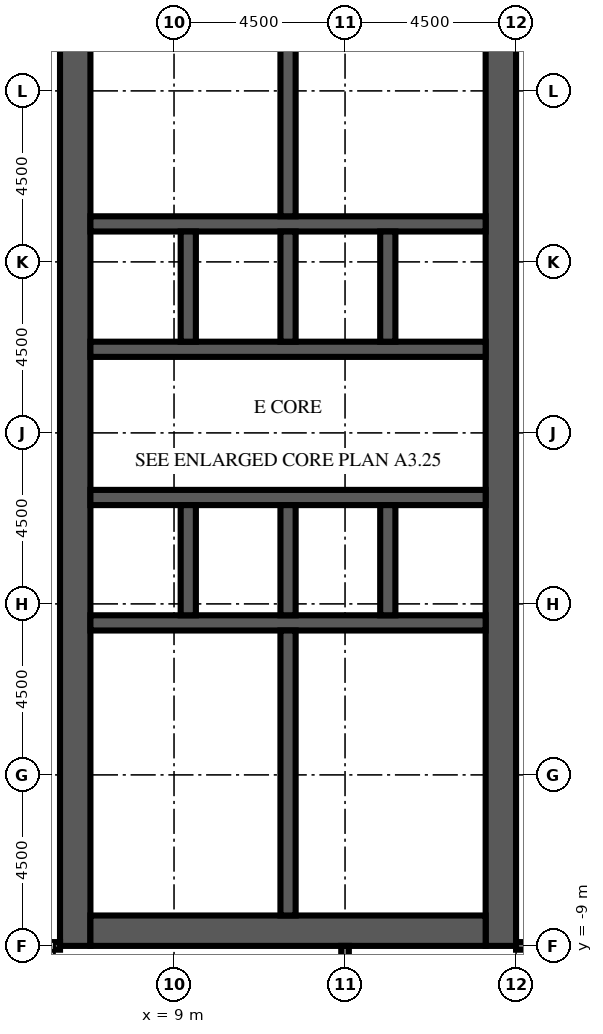
"""IFC4 building model, lengths in metres.
Left out: names, types, materials, properties, quantities, classifications, styles, units other than length and angle.
Written with IfcOpenShell. Run it as: python <this file> out.ifc"""

import sys

from ifc_helpers import new_model, si_unit, direction, frame, frame_2d, origin, place, context, subcontext, project, spatial, rectangle, extrude, element, fill, save


model = new_model("IFC4")
c1 = context("Model", 3, precision=1e-05, world=origin(), true_north=direction((0.0, 1.0)))
c2 = subcontext(c1, "Body", "Model", "MODEL_VIEW")
j1 = project(units=[si_unit("LENGTHUNIT", "METRE"), si_unit("PLANEANGLEUNIT", "RADIAN")], contexts=[c1])
p1 = place(None, origin())
s1 = spatial("IfcSite", under=j1, at=p1, CompositionType="ELEMENT")
p2 = place(p1, origin())
s2 = spatial("IfcBuilding", under=s1, at=p2, CompositionType="ELEMENT")
p3 = place(p2, frame((0.0, 0.0, 160.9)))
s3 = spatial("IfcBuildingStorey", under=s2, at=p3, CompositionType="ELEMENT", Elevation=160.9)
p4 = place(p3, frame((6.4, -9.0, 0.0), z_axis=(0.0, 0.0, 1.0), x_axis=(0.0, 1.0, 0.0)))
e1 = element("IfcWall", 1, at=p4, inside=s3, PredefinedType="SHEAR", context=c2, shape_type="SweptSolid", body=[
    extrude(rectangle(XDim=27.5, YDim=0.8, at=frame_2d((13.75, 0.0))), origin(), (0.0, 0.0, 1.0), 4.1),
])
p5 = place(p4, frame((12.55, 0.0, 0.0)))
e2 = element("IfcOpeningElement", 2, at=p5, cuts=e1, PredefinedType="OPENING", context=c2, shape_type="SweptSolid", body=[
    extrude(rectangle(XDim=2.4, YDim=2.4, at=frame_2d((1.2, 1.2))), frame((0.0, 0.41, 0.0), z_axis=(0.0, -1.0, 0.0), x_axis=(1.0, 0.0, 0.0)), (0.0, 0.0, 1.0), 0.82),
])
p6 = place(p4, frame((5.45, 0.0, 0.0)))
e3 = element("IfcOpeningElement", 3, at=p6, cuts=e1, PredefinedType="OPENING", context=c2, shape_type="SweptSolid", body=[
    extrude(rectangle(XDim=1.2, YDim=2.1, at=frame_2d((0.6, 1.05))), frame((0.0, 0.41, 0.0), z_axis=(0.0, -1.0, 0.0), x_axis=(1.0, 0.0, 0.0)), (0.0, 0.0, 1.0), 0.82),
])
p7 = place(p4, frame((19.45, 0.0, 0.0)))
e4 = element("IfcOpeningElement", 4, at=p7, cuts=e1, PredefinedType="OPENING", context=c2, shape_type="SweptSolid", body=[
    extrude(rectangle(XDim=1.0, YDim=2.1, at=frame_2d((0.5, 1.05))), frame((0.0, 0.41, 0.0), z_axis=(0.0, -1.0, 0.0), x_axis=(1.0, 0.0, 0.0)), (0.0, 0.0, 1.0), 0.82),
])
p8 = place(p4, frame((21.137, 0.0, 0.0)))
e5 = element("IfcOpeningElement", 5, at=p8, cuts=e1, PredefinedType="OPENING", context=c2, shape_type="SweptSolid", body=[
    extrude(rectangle(XDim=1.0, YDim=2.1, at=frame_2d((0.5, 1.05))), frame((0.0, 0.41, 0.0), z_axis=(0.0, -1.0, 0.0), x_axis=(1.0, 0.0, 0.0)), (0.0, 0.0, 1.0), 0.82),
])
p9 = place(p4, frame((23.2, 0.0, 0.0)))
e6 = element("IfcOpeningElement", 6, at=p9, cuts=e1, PredefinedType="OPENING", context=c2, shape_type="SweptSolid", body=[
    extrude(rectangle(XDim=1.0, YDim=2.1, at=frame_2d((0.5, 1.05))), frame((0.0, 0.41, 0.0), z_axis=(0.0, -1.0, 0.0), x_axis=(1.0, 0.0, 0.0)), (0.0, 0.0, 1.0), 0.82),
])
p10 = place(p4, frame((25.262, 0.0, 0.0)))
e7 = element("IfcOpeningElement", 7, at=p10, cuts=e1, PredefinedType="OPENING", context=c2, shape_type="SweptSolid", body=[
    extrude(rectangle(XDim=1.0, YDim=2.1, at=frame_2d((0.5, 1.05))), frame((0.0, 0.41, 0.0), z_axis=(0.0, -1.0, 0.0), x_axis=(1.0, 0.0, 0.0)), (0.0, 0.0, 1.0), 0.82),
])
p11 = place(p3, frame((17.6, -9.0, 0.0), z_axis=(0.0, 0.0, 1.0), x_axis=(0.0, 1.0, 0.0)))
e8 = element("IfcWall", 8, at=p11, inside=s3, PredefinedType="SHEAR", context=c2, shape_type="SweptSolid", body=[
    extrude(rectangle(XDim=27.5, YDim=0.8, at=frame_2d((13.75, 0.0))), origin(), (0.0, 0.0, 1.0), 4.1),
])
p12 = place(p11, frame((12.55, 0.0, 0.0)))
e9 = element("IfcOpeningElement", 9, at=p12, cuts=e8, PredefinedType="OPENING", context=c2, shape_type="SweptSolid", body=[
    extrude(rectangle(XDim=2.4, YDim=2.4, at=frame_2d((1.2, 1.2))), frame((0.0, 0.41, 0.0), z_axis=(0.0, -1.0, 0.0), x_axis=(1.0, 0.0, 0.0)), (0.0, 0.0, 1.0), 0.82),
])
p13 = place(p11, frame((6.825, 0.0, 0.0)))
e10 = element("IfcOpeningElement", 10, at=p13, cuts=e8, PredefinedType="OPENING", context=c2, shape_type="SweptSolid", body=[
    extrude(rectangle(XDim=1.2, YDim=2.1, at=frame_2d((0.6, 1.05))), frame((0.0, 0.41, 0.0), z_axis=(0.0, -1.0, 0.0), x_axis=(1.0, 0.0, 0.0)), (0.0, 0.0, 1.0), 0.82),
])
p14 = place(p11, frame((19.475, 0.0, 0.0)))
e11 = element("IfcOpeningElement", 11, at=p14, cuts=e8, PredefinedType="OPENING", context=c2, shape_type="SweptSolid", body=[
    extrude(rectangle(XDim=1.2, YDim=2.1, at=frame_2d((0.6, 1.05))), frame((0.0, 0.41, 0.0), z_axis=(0.0, -1.0, 0.0), x_axis=(1.0, 0.0, 0.0)), (0.0, 0.0, 1.0), 0.82),
])
p15 = place(p3, frame((6.8, -8.6, 0.0), z_axis=(0.0, 0.0, 1.0), x_axis=(1.0, 0.0, 0.0)))
e12 = element("IfcWall", 12, at=p15, inside=s3, PredefinedType="SHEAR", context=c2, shape_type="SweptSolid", body=[
    extrude(rectangle(XDim=10.4, YDim=0.8, at=frame_2d((5.2, 0.0))), origin(), (0.0, 0.0, 1.0), 4.1),
])
p16 = place(p3, frame((6.8, -0.5, 0.0), z_axis=(0.0, 0.0, 1.0), x_axis=(1.0, 0.0, 0.0)))
e13 = element("IfcWall", 13, at=p16, inside=s3, PredefinedType="SHEAR", context=c2, shape_type="SweptSolid", body=[
    extrude(rectangle(XDim=10.4, YDim=0.4, at=frame_2d((5.2, 0.0))), origin(), (0.0, 0.0, 1.0), 4.1),
])
p17 = place(p3, frame((6.8, 2.8, 0.0), z_axis=(0.0, 0.0, 1.0), x_axis=(1.0, 0.0, 0.0)))
e14 = element("IfcWall", 14, at=p17, inside=s3, PredefinedType="SHEAR", context=c2, shape_type="SweptSolid", body=[
    extrude(rectangle(XDim=10.4, YDim=0.4, at=frame_2d((5.2, 0.0))), origin(), (0.0, 0.0, 1.0), 4.1),
])
p18 = place(p17, frame((0.738, 0.0, 0.0)))
e15 = element("IfcOpeningElement", 15, at=p18, cuts=e14, PredefinedType="OPENING", context=c2, shape_type="SweptSolid", body=[
    extrude(rectangle(XDim=1.1, YDim=2.1, at=frame_2d((0.55, 1.05))), frame((0.0, 0.21, 0.0), z_axis=(0.0, -1.0, 0.0), x_axis=(1.0, 0.0, 0.0)), (0.0, 0.0, 1.0), 0.42),
])
p19 = place(p17, frame((3.337, 0.0, 0.0)))
e16 = element("IfcOpeningElement", 16, at=p19, cuts=e14, PredefinedType="OPENING", context=c2, shape_type="SweptSolid", body=[
    extrude(rectangle(XDim=1.1, YDim=2.1, at=frame_2d((0.55, 1.05))), frame((0.0, 0.21, 0.0), z_axis=(0.0, -1.0, 0.0), x_axis=(1.0, 0.0, 0.0)), (0.0, 0.0, 1.0), 0.42),
])
p20 = place(p17, frame((6.012, 0.0, 0.0)))
e17 = element("IfcOpeningElement", 17, at=p20, cuts=e14, PredefinedType="OPENING", context=c2, shape_type="SweptSolid", body=[
    extrude(rectangle(XDim=1.0, YDim=2.1, at=frame_2d((0.5, 1.05))), frame((0.0, 0.21, 0.0), z_axis=(0.0, -1.0, 0.0), x_axis=(1.0, 0.0, 0.0)), (0.0, 0.0, 1.0), 0.42),
])
p21 = place(p17, frame((8.613, 0.0, 0.0)))
e18 = element("IfcOpeningElement", 18, at=p21, cuts=e14, PredefinedType="OPENING", context=c2, shape_type="SweptSolid", body=[
    extrude(rectangle(XDim=1.0, YDim=2.1, at=frame_2d((0.5, 1.05))), frame((0.0, 0.21, 0.0), z_axis=(0.0, -1.0, 0.0), x_axis=(1.0, 0.0, 0.0)), (0.0, 0.0, 1.0), 0.42),
])
p22 = place(p3, frame((6.8, 6.7, 0.0), z_axis=(0.0, 0.0, 1.0), x_axis=(1.0, 0.0, 0.0)))
e19 = element("IfcWall", 19, at=p22, inside=s3, PredefinedType="SHEAR", context=c2, shape_type="SweptSolid", body=[
    extrude(rectangle(XDim=10.4, YDim=0.4, at=frame_2d((5.2, 0.0))), origin(), (0.0, 0.0, 1.0), 4.1),
])
p23 = place(p22, frame((3.337, 0.0, 0.0)))
e20 = element("IfcOpeningElement", 20, at=p23, cuts=e19, PredefinedType="OPENING", context=c2, shape_type="SweptSolid", body=[
    extrude(rectangle(XDim=1.1, YDim=2.1, at=frame_2d((0.55, 1.05))), frame((0.0, 0.21, 0.0), z_axis=(0.0, -1.0, 0.0), x_axis=(1.0, 0.0, 0.0)), (0.0, 0.0, 1.0), 0.42),
])
p24 = place(p22, frame((5.962, 0.0, 0.0)))
e21 = element("IfcOpeningElement", 21, at=p24, cuts=e19, PredefinedType="OPENING", context=c2, shape_type="SweptSolid", body=[
    extrude(rectangle(XDim=1.1, YDim=2.1, at=frame_2d((0.55, 1.05))), frame((0.0, 0.21, 0.0), z_axis=(0.0, -1.0, 0.0), x_axis=(1.0, 0.0, 0.0)), (0.0, 0.0, 1.0), 0.42),
])
p25 = place(p22, frame((8.663, 0.0, 0.0)))
e22 = element("IfcOpeningElement", 22, at=p25, cuts=e19, PredefinedType="OPENING", context=c2, shape_type="SweptSolid", body=[
    extrude(rectangle(XDim=1.1, YDim=2.1, at=frame_2d((0.55, 1.05))), frame((0.0, 0.21, 0.0), z_axis=(0.0, -1.0, 0.0), x_axis=(1.0, 0.0, 0.0)), (0.0, 0.0, 1.0), 0.42),
])
p26 = place(p22, frame((0.688, 0.0, 0.0)))
e23 = element("IfcOpeningElement", 23, at=p26, cuts=e19, PredefinedType="OPENING", context=c2, shape_type="SweptSolid", body=[
    extrude(rectangle(XDim=1.0, YDim=2.1, at=frame_2d((0.5, 1.05))), frame((0.0, 0.21, 0.0), z_axis=(0.0, -1.0, 0.0), x_axis=(1.0, 0.0, 0.0)), (0.0, 0.0, 1.0), 0.42),
])
p27 = place(p3, frame((6.8, 10.0, 0.0), z_axis=(0.0, 0.0, 1.0), x_axis=(1.0, 0.0, 0.0)))
e24 = element("IfcWall", 24, at=p27, inside=s3, PredefinedType="SHEAR", context=c2, shape_type="SweptSolid", body=[
    extrude(rectangle(XDim=10.4, YDim=0.4, at=frame_2d((5.2, 0.0))), origin(), (0.0, 0.0, 1.0), 4.1),
])
for number, where, z_axis, x_axis in (
    (25, (9.375, -0.3, 0.0), (0.0, 0.0, 1.0), (0.0, 1.0, 0.0)),
    (26, (9.375, 6.9, 0.0), (0.0, 0.0, 1.0), (0.0, 1.0, 0.0)),
    (27, (12.0, -0.3, 0.0), (0.0, 0.0, 1.0), (0.0, 1.0, 0.0)),
    (28, (12.0, 6.9, 0.0), (0.0, 0.0, 1.0), (0.0, 1.0, 0.0)),
    (29, (14.625, -0.3, 0.0), (0.0, 0.0, 1.0), (0.0, 1.0, 0.0)),
    (30, (14.625, 6.9, 0.0), (0.0, 0.0, 1.0), (0.0, 1.0, 0.0)),
):
    element("IfcWall", number, at=place(p3, frame(where, z_axis=z_axis, x_axis=x_axis)), inside=s3, PredefinedType="SHEAR", context=c2, shape_type="SweptSolid", body=[
        extrude(rectangle(XDim=2.9, YDim=0.4, at=frame_2d((1.45, 0.0))), origin(), (0.0, 0.0, 1.0), 4.1),
    ])
for number, where, z_axis, x_axis in (
    (31, (12.0, -8.2, 0.0), (0.0, 0.0, 1.0), (0.0, 1.0, 0.0)),
    (32, (12.0, 10.2, 0.0), (0.0, 0.0, 1.0), (0.0, 1.0, 0.0)),
):
    element("IfcWall", number, at=place(p3, frame(where, z_axis=z_axis, x_axis=x_axis)), inside=s3, PredefinedType="SHEAR", context=c2, shape_type="SweptSolid", body=[
        extrude(rectangle(XDim=7.5, YDim=0.4, at=frame_2d((3.75, 0.0))), origin(), (0.0, 0.0, 1.0), 4.1),
    ])
p28 = place(p3, frame((6.8, -5.2, 0.0), z_axis=(0.0, 0.0, 1.0), x_axis=(1.0, 0.0, 0.0)))
e33 = element("IfcWall", 33, at=p28, inside=s3, PredefinedType="PARTITIONING", context=c2, shape_type="SweptSolid", body=[
    extrude(rectangle(XDim=1.5, YDim=0.1, at=frame_2d((0.75, 0.0))), origin(), (0.0, 0.0, 1.0), 3.65),
])
p29 = place(p28, frame((0.25, 0.0, 0.0)))
e34 = element("IfcOpeningElement", 34, at=p29, cuts=e33, PredefinedType="OPENING", context=c2, shape_type="SweptSolid", body=[
    extrude(rectangle(XDim=1.0, YDim=2.1, at=frame_2d((0.5, 1.05))), frame((0.0, 0.06, 0.0), z_axis=(0.0, -1.0, 0.0), x_axis=(1.0, 0.0, 0.0)), (0.0, 0.0, 1.0), 0.12),
])
p30 = place(p3, frame((8.3, -5.2, 0.0), z_axis=(0.0, 0.0, 1.0), x_axis=(0.0, 1.0, 0.0)))
e35 = element("IfcWall", 35, at=p30, inside=s3, PredefinedType="PARTITIONING", context=c2, shape_type="SweptSolid", body=[
    extrude(rectangle(XDim=2.25, YDim=0.1, at=frame_2d((1.125, 0.0))), origin(), (0.0, 0.0, 1.0), 3.65),
])
p31 = place(p30, frame((0.625, 0.0, 0.0)))
e36 = element("IfcOpeningElement", 36, at=p31, cuts=e35, PredefinedType="OPENING", context=c2, shape_type="SweptSolid", body=[
    extrude(rectangle(XDim=1.0, YDim=2.1, at=frame_2d((0.5, 1.05))), frame((0.0, 0.06, 0.0), z_axis=(0.0, -1.0, 0.0), x_axis=(1.0, 0.0, 0.0)), (0.0, 0.0, 1.0), 0.12),
])
p32 = place(p3, frame((8.3, -2.95, 0.0), z_axis=(0.0, 0.0, 1.0), x_axis=(0.0, 1.0, 0.0)))
e37 = element("IfcWall", 37, at=p32, inside=s3, PredefinedType="PARTITIONING", context=c2, shape_type="SweptSolid", body=[
    extrude(rectangle(XDim=2.25, YDim=0.1, at=frame_2d((1.125, 0.0))), origin(), (0.0, 0.0, 1.0), 3.65),
])
p33 = place(p32, frame((0.625, 0.0, 0.0)))
e38 = element("IfcOpeningElement", 38, at=p33, cuts=e37, PredefinedType="OPENING", context=c2, shape_type="SweptSolid", body=[
    extrude(rectangle(XDim=1.0, YDim=2.1, at=frame_2d((0.5, 1.05))), frame((0.0, 0.06, 0.0), z_axis=(0.0, -1.0, 0.0), x_axis=(1.0, 0.0, 0.0)), (0.0, 0.0, 1.0), 0.12),
])
for number, where, z_axis, x_axis in (
    (39, (8.3, -5.2, 0.0), (0.0, 0.0, 1.0), (1.0, 0.0, 0.0)),
    (40, (8.3, -2.95, 0.0), (0.0, 0.0, 1.0), (1.0, 0.0, 0.0)),
):
    element("IfcWall", number, at=place(p3, frame(where, z_axis=z_axis, x_axis=x_axis)), inside=s3, PredefinedType="PARTITIONING", context=c2, shape_type="SweptSolid", body=[
        extrude(rectangle(XDim=3.5, YDim=0.1, at=frame_2d((1.75, 0.0))), origin(), (0.0, 0.0, 1.0), 3.65),
    ])
for number, where, z_axis, x_axis in (
    (41, (6.8, 11.7, 0.0), (0.0, 0.0, 1.0), (1.0, 0.0, 0.0)),
    (42, (6.8, 13.575, 0.0), (0.0, 0.0, 1.0), (1.0, 0.0, 0.0)),
):
    element("IfcWall", number, at=place(p3, frame(where, z_axis=z_axis, x_axis=x_axis)), inside=s3, PredefinedType="PARTITIONING", context=c2, shape_type="SweptSolid", body=[
        extrude(rectangle(XDim=5.0, YDim=0.1, at=frame_2d((2.5, 0.0))), origin(), (0.0, 0.0, 1.0), 3.65),
    ])
p34 = place(p3, frame((13.5, -26.5, 0.0), z_axis=(0.0, 0.0, 1.0), x_axis=(0.0, 1.0, 0.0)))
e43 = element("IfcWall", 43, at=p34, inside=s3, PredefinedType="PARTITIONING", context=c2, shape_type="SweptSolid", body=[
    extrude(rectangle(XDim=17.5, YDim=0.2, at=frame_2d((8.75, 0.0))), origin(), (0.0, 0.0, 1.0), 3.65),
])
p35 = place(p3, frame((6.0, -9.0, 0.0), z_axis=(0.0, 0.0, 1.0), x_axis=(-1.0, 0.0, 0.0)))
e44 = element("IfcWall", 44, at=p35, inside=s3, PredefinedType="PARTITIONING", context=c2, shape_type="SweptSolid", body=[
    extrude(rectangle(XDim=4.5, YDim=0.2, at=frame_2d((2.25, 0.0))), origin(), (0.0, 0.0, 1.0), 3.65),
])
p36 = place(p35, frame((1.9, 0.0, 0.0)))
e45 = element("IfcOpeningElement", 45, at=p36, cuts=e44, PredefinedType="OPENING", context=c2, shape_type="SweptSolid", body=[
    extrude(rectangle(XDim=1.0, YDim=2.1, at=frame_2d((0.5, 1.05))), frame((0.0, 0.11, 0.0), z_axis=(0.0, -1.0, 0.0), x_axis=(1.0, 0.0, 0.0)), (0.0, 0.0, 1.0), 0.22),
])
p37 = place(p35, frame((0.15, 0.0, 0.0)))
e46 = element("IfcOpeningElement", 46, at=p37, cuts=e44, PredefinedType="OPENING", context=c2, shape_type="SweptSolid", body=[
    extrude(rectangle(XDim=1.0, YDim=2.1, at=frame_2d((0.5, 1.05))), frame((0.0, 0.11, 0.0), z_axis=(0.0, -1.0, 0.0), x_axis=(1.0, 0.0, 0.0)), (0.0, 0.0, 1.0), 0.22),
])
p38 = place(p3, frame((21.0, -9.0, 0.0), z_axis=(0.0, 0.0, 1.0), x_axis=(-1.0, 0.0, 0.0)))
e47 = element("IfcWall", 47, at=p38, inside=s3, PredefinedType="PARTITIONING", context=c2, shape_type="SweptSolid", body=[
    extrude(rectangle(XDim=3.0, YDim=0.2, at=frame_2d((1.5, 0.0))), origin(), (0.0, 0.0, 1.0), 3.65),
])
p39 = place(p38, frame((0.65, 0.0, 0.0)))
e48 = element("IfcOpeningElement", 48, at=p39, cuts=e47, PredefinedType="OPENING", context=c2, shape_type="SweptSolid", body=[
    extrude(rectangle(XDim=1.0, YDim=2.1, at=frame_2d((0.5, 1.05))), frame((0.0, 0.11, 0.0), z_axis=(0.0, -1.0, 0.0), x_axis=(1.0, 0.0, 0.0)), (0.0, 0.0, 1.0), 0.22),
])
p40 = place(p18, origin())
e49 = element("IfcDoor", 49, at=p40, inside=s3, OperationType="DOUBLE_DOOR_SLIDING", PredefinedType="DOOR", context=c2, shape_type="SweptSolid", body=[
    extrude(rectangle(XDim=1.1, YDim=2.1, at=frame_2d((0.55, 1.05))), frame((0.0, 0.025, 0.0), z_axis=(0.0, -1.0, 0.0), x_axis=(1.0, 0.0, 0.0)), (0.0, 0.0, 1.0), 0.05),
])
fill(e15, e49)
p41 = place(p19, origin())
e50 = element("IfcDoor", 50, at=p41, inside=s3, OperationType="DOUBLE_DOOR_SLIDING", PredefinedType="DOOR", context=c2, shape_type="SweptSolid", body=[
    extrude(rectangle(XDim=1.1, YDim=2.1, at=frame_2d((0.55, 1.05))), frame((0.0, 0.025, 0.0), z_axis=(0.0, -1.0, 0.0), x_axis=(1.0, 0.0, 0.0)), (0.0, 0.0, 1.0), 0.05),
])
fill(e16, e50)
p42 = place(p23, origin())
e51 = element("IfcDoor", 51, at=p42, inside=s3, OperationType="DOUBLE_DOOR_SLIDING", PredefinedType="DOOR", context=c2, shape_type="SweptSolid", body=[
    extrude(rectangle(XDim=1.1, YDim=2.1, at=frame_2d((0.55, 1.05))), frame((0.0, 0.025, 0.0), z_axis=(0.0, -1.0, 0.0), x_axis=(1.0, 0.0, 0.0)), (0.0, 0.0, 1.0), 0.05),
])
fill(e20, e51)
p43 = place(p24, origin())
e52 = element("IfcDoor", 52, at=p43, inside=s3, OperationType="DOUBLE_DOOR_SLIDING", PredefinedType="DOOR", context=c2, shape_type="SweptSolid", body=[
    extrude(rectangle(XDim=1.1, YDim=2.1, at=frame_2d((0.55, 1.05))), frame((0.0, 0.025, 0.0), z_axis=(0.0, -1.0, 0.0), x_axis=(1.0, 0.0, 0.0)), (0.0, 0.0, 1.0), 0.05),
])
fill(e21, e52)
p44 = place(p25, origin())
e53 = element("IfcDoor", 53, at=p44, inside=s3, OperationType="DOUBLE_DOOR_SLIDING", PredefinedType="DOOR", context=c2, shape_type="SweptSolid", body=[
    extrude(rectangle(XDim=1.1, YDim=2.1, at=frame_2d((0.55, 1.05))), frame((0.0, 0.025, 0.0), z_axis=(0.0, -1.0, 0.0), x_axis=(1.0, 0.0, 0.0)), (0.0, 0.0, 1.0), 0.05),
])
fill(e22, e53)
p45 = place(p5, origin())
e54 = element("IfcDoor", 54, at=p45, inside=s3, OperationType="DOUBLE_DOOR_DOUBLE_SWING", PredefinedType="DOOR", context=c2, shape_type="SweptSolid", body=[
    extrude(rectangle(XDim=2.4, YDim=2.4, at=frame_2d((1.2, 1.2))), frame((0.0, 0.025, 0.0), z_axis=(0.0, -1.0, 0.0), x_axis=(1.0, 0.0, 0.0)), (0.0, 0.0, 1.0), 0.05),
])
fill(e2, e54)
p46 = place(p12, origin())
e55 = element("IfcDoor", 55, at=p46, inside=s3, OperationType="DOUBLE_DOOR_DOUBLE_SWING", PredefinedType="DOOR", context=c2, shape_type="SweptSolid", body=[
    extrude(rectangle(XDim=2.4, YDim=2.4, at=frame_2d((1.2, 1.2))), frame((0.0, 0.025, 0.0), z_axis=(0.0, -1.0, 0.0), x_axis=(1.0, 0.0, 0.0)), (0.0, 0.0, 1.0), 0.05),
])
fill(e9, e55)
p47 = place(p13, frame((1.2, 0.0, 0.0), z_axis=(0.0, 0.0, 1.0), x_axis=(-1.0, 0.0, 0.0)))
e56 = element("IfcDoor", 56, at=p47, inside=s3, OperationType="SINGLE_SWING_LEFT", PredefinedType="DOOR", context=c2, shape_type="SweptSolid", body=[
    extrude(rectangle(XDim=1.2, YDim=2.1, at=frame_2d((0.6, 1.05))), frame((0.0, 0.025, 0.0), z_axis=(0.0, -1.0, 0.0), x_axis=(1.0, 0.0, 0.0)), (0.0, 0.0, 1.0), 0.05),
])
fill(e10, e56)
p48 = place(p14, frame((1.2, 0.0, 0.0), z_axis=(0.0, 0.0, 1.0), x_axis=(-1.0, 0.0, 0.0)))
e57 = element("IfcDoor", 57, at=p48, inside=s3, OperationType="SINGLE_SWING_LEFT", PredefinedType="DOOR", context=c2, shape_type="SweptSolid", body=[
    extrude(rectangle(XDim=1.2, YDim=2.1, at=frame_2d((0.6, 1.05))), frame((0.0, 0.025, 0.0), z_axis=(0.0, -1.0, 0.0), x_axis=(1.0, 0.0, 0.0)), (0.0, 0.0, 1.0), 0.05),
])
fill(e11, e57)
p49 = place(p20, origin())
e58 = element("IfcDoor", 58, at=p49, inside=s3, OperationType="SINGLE_SWING_LEFT", PredefinedType="DOOR", context=c2, shape_type="SweptSolid", body=[
    extrude(rectangle(XDim=1.0, YDim=2.1, at=frame_2d((0.5, 1.05))), frame((0.0, 0.025, 0.0), z_axis=(0.0, -1.0, 0.0), x_axis=(1.0, 0.0, 0.0)), (0.0, 0.0, 1.0), 0.05),
])
fill(e17, e58)
p50 = place(p21, origin())
e59 = element("IfcDoor", 59, at=p50, inside=s3, OperationType="SINGLE_SWING_RIGHT", PredefinedType="DOOR", context=c2, shape_type="SweptSolid", body=[
    extrude(rectangle(XDim=1.0, YDim=2.1, at=frame_2d((0.5, 1.05))), frame((0.0, 0.025, 0.0), z_axis=(0.0, -1.0, 0.0), x_axis=(1.0, 0.0, 0.0)), (0.0, 0.0, 1.0), 0.05),
])
fill(e18, e59)
p51 = place(p26, origin())
e60 = element("IfcDoor", 60, at=p51, inside=s3, OperationType="SINGLE_SWING_LEFT", PredefinedType="DOOR", context=c2, shape_type="SweptSolid", body=[
    extrude(rectangle(XDim=1.0, YDim=2.1, at=frame_2d((0.5, 1.05))), frame((0.0, 0.025, 0.0), z_axis=(0.0, -1.0, 0.0), x_axis=(1.0, 0.0, 0.0)), (0.0, 0.0, 1.0), 0.05),
])
fill(e23, e60)
p52 = place(p6, origin())
e61 = element("IfcDoor", 61, at=p52, inside=s3, OperationType="SINGLE_SWING_RIGHT", PredefinedType="DOOR", context=c2, shape_type="SweptSolid", body=[
    extrude(rectangle(XDim=1.2, YDim=2.1, at=frame_2d((0.6, 1.05))), frame((0.0, -0.325, 0.0), z_axis=(0.0, -1.0, 0.0), x_axis=(1.0, 0.0, 0.0)), (0.0, 0.0, 1.0), 0.05),
])
fill(e3, e61)
p53 = place(p29, origin())
e62 = element("IfcDoor", 62, at=p53, inside=s3, OperationType="SINGLE_SWING_LEFT", PredefinedType="DOOR", context=c2, shape_type="SweptSolid", body=[
    extrude(rectangle(XDim=1.0, YDim=2.1, at=frame_2d((0.5, 1.05))), frame((0.0, 0.025, 0.0), z_axis=(0.0, -1.0, 0.0), x_axis=(1.0, 0.0, 0.0)), (0.0, 0.0, 1.0), 0.05),
])
fill(e34, e62)
p54 = place(p31, origin())
e63 = element("IfcDoor", 63, at=p54, inside=s3, OperationType="SINGLE_SWING_RIGHT", PredefinedType="DOOR", context=c2, shape_type="SweptSolid", body=[
    extrude(rectangle(XDim=1.0, YDim=2.1, at=frame_2d((0.5, 1.05))), frame((0.0, 0.025, 0.0), z_axis=(0.0, -1.0, 0.0), x_axis=(1.0, 0.0, 0.0)), (0.0, 0.0, 1.0), 0.05),
])
fill(e36, e63)
p55 = place(p33, origin())
e64 = element("IfcDoor", 64, at=p55, inside=s3, OperationType="SINGLE_SWING_LEFT", PredefinedType="DOOR", context=c2, shape_type="SweptSolid", body=[
    extrude(rectangle(XDim=1.0, YDim=2.1, at=frame_2d((0.5, 1.05))), frame((0.0, 0.025, 0.0), z_axis=(0.0, -1.0, 0.0), x_axis=(1.0, 0.0, 0.0)), (0.0, 0.0, 1.0), 0.05),
])
fill(e38, e64)
p56 = place(p7, origin())
e65 = element("IfcDoor", 65, at=p56, inside=s3, OperationType="SINGLE_SWING_RIGHT", PredefinedType="DOOR", context=c2, shape_type="SweptSolid", body=[
    extrude(rectangle(XDim=1.0, YDim=2.1, at=frame_2d((0.5, 1.05))), frame((0.0, -0.325, 0.0), z_axis=(0.0, -1.0, 0.0), x_axis=(1.0, 0.0, 0.0)), (0.0, 0.0, 1.0), 0.05),
])
fill(e4, e65)
p57 = place(p8, origin())
e66 = element("IfcDoor", 66, at=p57, inside=s3, OperationType="SINGLE_SWING_LEFT", PredefinedType="DOOR", context=c2, shape_type="SweptSolid", body=[
    extrude(rectangle(XDim=1.0, YDim=2.1, at=frame_2d((0.5, 1.05))), frame((0.0, -0.325, 0.0), z_axis=(0.0, -1.0, 0.0), x_axis=(1.0, 0.0, 0.0)), (0.0, 0.0, 1.0), 0.05),
])
fill(e5, e66)
p58 = place(p9, origin())
e67 = element("IfcDoor", 67, at=p58, inside=s3, OperationType="SINGLE_SWING_RIGHT", PredefinedType="DOOR", context=c2, shape_type="SweptSolid", body=[
    extrude(rectangle(XDim=1.0, YDim=2.1, at=frame_2d((0.5, 1.05))), frame((0.0, -0.325, 0.0), z_axis=(0.0, -1.0, 0.0), x_axis=(1.0, 0.0, 0.0)), (0.0, 0.0, 1.0), 0.05),
])
fill(e6, e67)
p59 = place(p37, origin())
e68 = element("IfcDoor", 68, at=p59, inside=s3, OperationType="SINGLE_SWING_LEFT", PredefinedType="DOOR", context=c2, shape_type="SweptSolid", body=[
    extrude(rectangle(XDim=1.0, YDim=2.1, at=frame_2d((0.5, 1.05))), frame((0.0, 0.025, 0.0), z_axis=(0.0, -1.0, 0.0), x_axis=(1.0, 0.0, 0.0)), (0.0, 0.0, 1.0), 0.05),
])
fill(e46, e68)
save(model, sys.argv[1])
